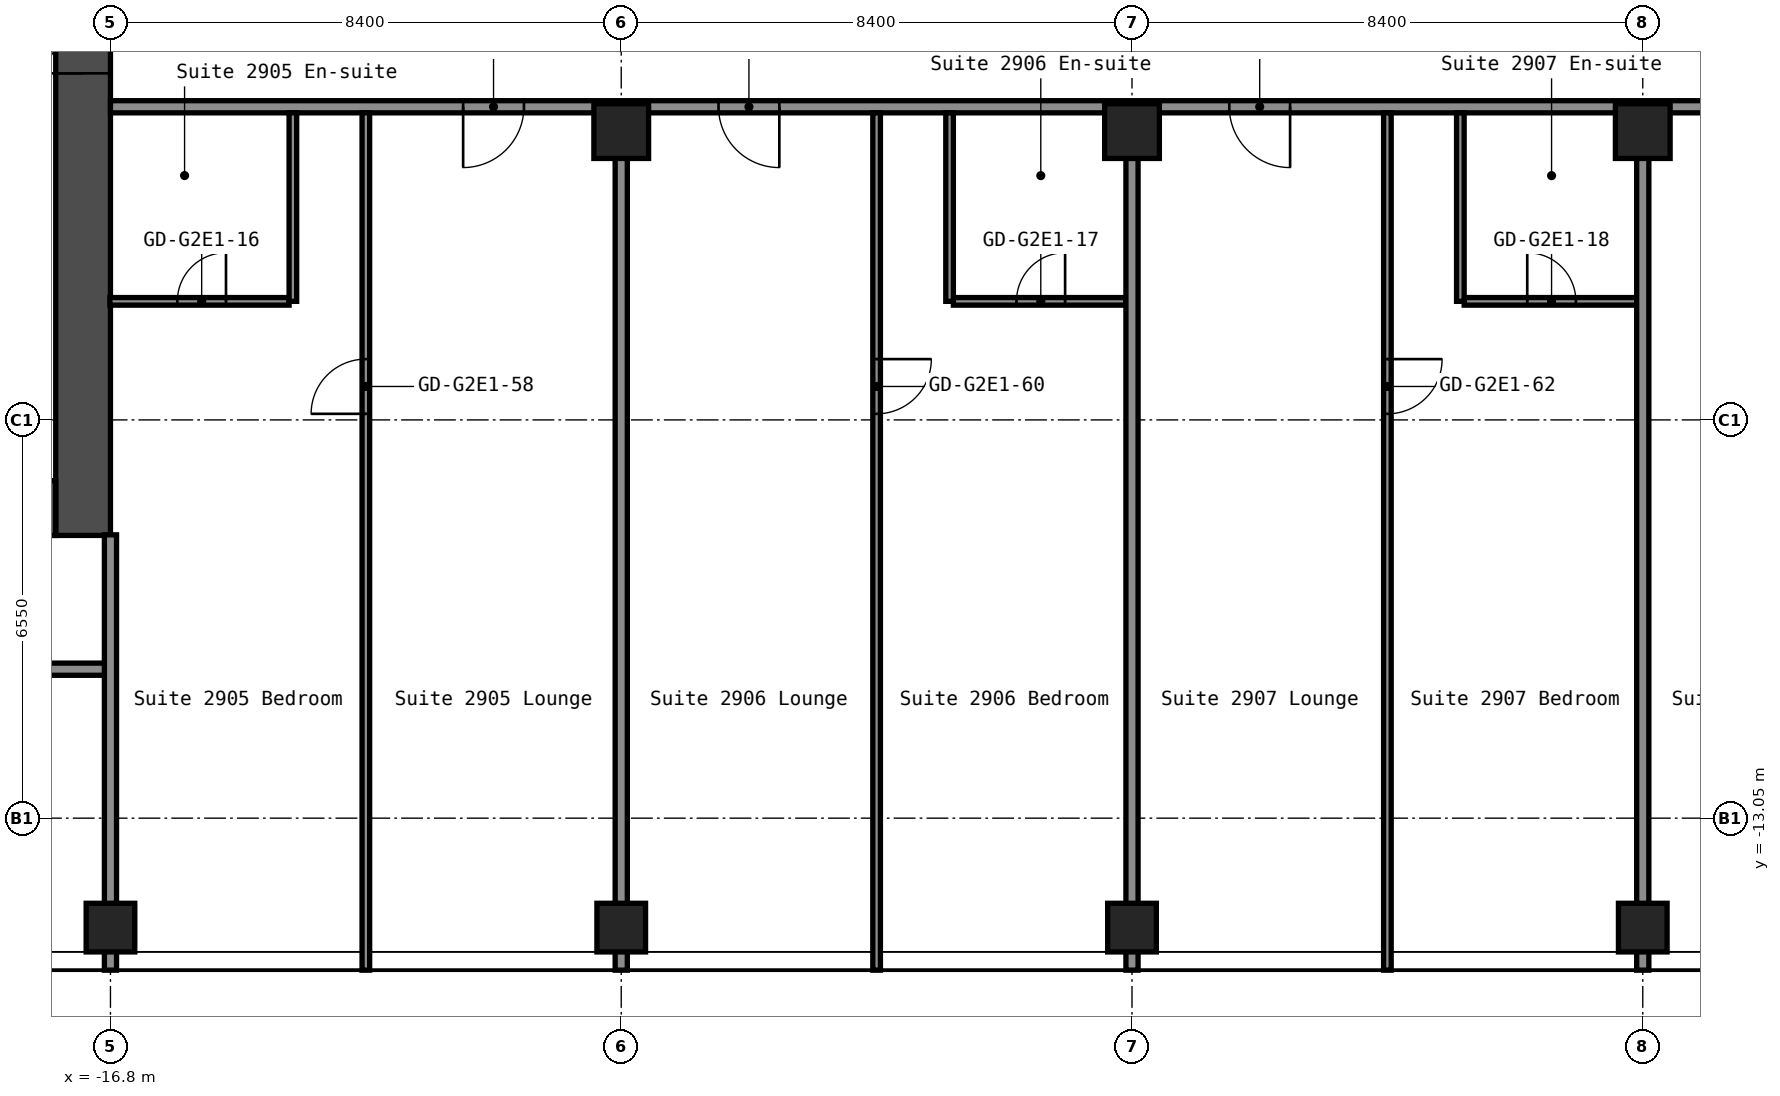
"""IFC4 building model, lengths in metres.
Left out: names, types, materials, properties, quantities, classifications, styles, units other than length and angle.
Written with IfcOpenShell. Run it as: python <this file> out.ifc"""

import sys

from ifc_helpers import new_model, si_unit, direction, frame, frame_2d, origin, origin_2d, place, context, subcontext, project, spatial, rectangle, hollow_rectangle, extrude, element, fill, save


model = new_model("IFC4")
c1 = context("Model", 3, precision=1e-05, world=origin(), true_north=direction((0.0, 1.0)))
c2 = subcontext(c1, "Body", "Model", "MODEL_VIEW")
j1 = project(units=[si_unit("LENGTHUNIT", "METRE"), si_unit("PLANEANGLEUNIT", "RADIAN")], contexts=[c1])
p1 = place(None, origin())
s1 = spatial("IfcSite", under=j1, at=p1, CompositionType="ELEMENT")
p2 = place(p1, origin())
s2 = spatial("IfcBuilding", under=s1, at=p2, CompositionType="ELEMENT")
p3 = place(p2, frame((0.0, 0.0, 104.2)))
s3 = spatial("IfcBuildingStorey", under=s2, at=p3, CompositionType="ELEMENT", Elevation=104.2)
for number, where, z_axis, x_axis in (
    (1, (-16.8, -14.85, 0.0), (0.0, 0.0, 1.0), (1.0, 0.0, 0.0)),
    (2, (-8.4, -14.85, 0.0), (0.0, 0.0, 1.0), (1.0, 0.0, 0.0)),
):
    element("IfcColumn", number, at=place(p3, frame(where, z_axis=z_axis, x_axis=x_axis)), inside=s3, PredefinedType="COLUMN", context=c2, shape_type="SweptSolid", body=[
        extrude(hollow_rectangle(XDim=0.8, YDim=0.8, WallThickness=0.032, at=origin_2d()), origin(), (0.0, 0.0, 1.0), 2.8),
    ])
p4 = place(p3, frame((-8.4, -1.75, 0.0), z_axis=(0.0, 0.0, 1.0), x_axis=(1.0, 0.0, 0.0)))
e3 = element("IfcColumn", 3, at=p4, inside=s3, PredefinedType="COLUMN", context=c2, shape_type="SweptSolid", body=[
    extrude(hollow_rectangle(XDim=0.9, YDim=0.9, WallThickness=0.036, at=origin_2d()), origin(), (0.0, 0.0, 1.0), 2.8),
])
p5 = place(p3, frame((0.0, -14.85, 0.0), z_axis=(0.0, 0.0, 1.0), x_axis=(1.0, 0.0, 0.0)))
e4 = element("IfcColumn", 4, at=p5, inside=s3, PredefinedType="COLUMN", context=c2, shape_type="SweptSolid", body=[
    extrude(hollow_rectangle(XDim=0.8, YDim=0.8, WallThickness=0.032, at=origin_2d()), origin(), (0.0, 0.0, 1.0), 2.8),
])
p6 = place(p3, frame((0.0, -1.75, 0.0), z_axis=(0.0, 0.0, 1.0), x_axis=(1.0, 0.0, 0.0)))
e5 = element("IfcColumn", 5, at=p6, inside=s3, PredefinedType="COLUMN", context=c2, shape_type="SweptSolid", body=[
    extrude(hollow_rectangle(XDim=0.9, YDim=0.9, WallThickness=0.036, at=origin_2d()), origin(), (0.0, 0.0, 1.0), 2.8),
])
p7 = place(p3, frame((8.4, -14.85, 0.0), z_axis=(0.0, 0.0, 1.0), x_axis=(1.0, 0.0, 0.0)))
e6 = element("IfcColumn", 6, at=p7, inside=s3, PredefinedType="COLUMN", context=c2, shape_type="SweptSolid", body=[
    extrude(hollow_rectangle(XDim=0.8, YDim=0.8, WallThickness=0.032, at=origin_2d()), origin(), (0.0, 0.0, 1.0), 2.8),
])
p8 = place(p3, frame((8.4, -1.75, 0.0), z_axis=(0.0, 0.0, 1.0), x_axis=(1.0, 0.0, 0.0)))
e7 = element("IfcColumn", 7, at=p8, inside=s3, PredefinedType="COLUMN", context=c2, shape_type="SweptSolid", body=[
    extrude(hollow_rectangle(XDim=0.9, YDim=0.9, WallThickness=0.036, at=origin_2d()), origin(), (0.0, 0.0, 1.0), 2.8),
])
p9 = place(p3, frame((-17.25, -8.4, 0.0), z_axis=(0.0, 0.0, 1.0), x_axis=(0.0, 1.0, 0.0)))
e8 = element("IfcWall", 8, at=p9, inside=s3, PredefinedType="SHEAR", context=c2, shape_type="SweptSolid", body=[
    extrude(rectangle(XDim=16.8, YDim=0.9, at=frame_2d((8.4, 0.0))), origin(), (0.0, 0.0, 1.0), 2.8),
])
p10 = place(p9, frame((7.6, 0.0, 0.0)))
e9 = element("IfcOpeningElement", 9, at=p10, cuts=e8, PredefinedType="OPENING", context=c2, shape_type="SweptSolid", body=[
    extrude(rectangle(XDim=1.2, YDim=2.1, at=frame_2d((0.6, 1.05))), frame((0.0, 0.46, 0.0), z_axis=(0.0, -1.0, 0.0), x_axis=(1.0, 0.0, 0.0)), (0.0, 0.0, 1.0), 0.92),
])
p11 = place(p3, frame((-32.7, -7.95, 0.0), z_axis=(0.0, 0.0, 1.0), x_axis=(1.0, 0.0, 0.0)))
e10 = element("IfcWall", 10, at=p11, inside=s3, PredefinedType="SHEAR", context=c2, shape_type="SweptSolid", body=[
    extrude(rectangle(XDim=15.0, YDim=0.9, at=frame_2d((7.5, 0.0))), origin(), (0.0, 0.0, 1.0), 2.8),
])
p12 = place(p11, frame((11.45, 0.0, 0.0)))
e11 = element("IfcOpeningElement", 11, at=p12, cuts=e10, PredefinedType="OPENING", context=c2, shape_type="SweptSolid", body=[
    extrude(rectangle(XDim=1.0, YDim=2.1, at=frame_2d((0.5, 1.05))), frame((0.0, 0.46, 0.0), z_axis=(0.0, -1.0, 0.0), x_axis=(1.0, 0.0, 0.0)), (0.0, 0.0, 1.0), 0.92),
])
p13 = place(p3, frame((-46.5, -10.6, 0.0), z_axis=(0.0, 0.0, 1.0), x_axis=(1.0, 0.0, 0.0)))
e12 = element("IfcWall", 12, at=p13, inside=s3, PredefinedType="PARTITIONING", context=c2, shape_type="SweptSolid", body=[
    extrude(rectangle(XDim=29.7, YDim=0.2, at=frame_2d((14.85, 0.0))), origin(), (0.0, 0.0, 1.0), 2.8),
])
p14 = place(p13, frame((1.95, 0.0, 0.0)))
e13 = element("IfcOpeningElement", 13, at=p14, cuts=e12, PredefinedType="OPENING", context=c2, shape_type="SweptSolid", body=[
    extrude(rectangle(XDim=0.9, YDim=2.1, at=frame_2d((0.45, 1.05))), frame((0.0, 0.11, 0.0), z_axis=(0.0, -1.0, 0.0), x_axis=(1.0, 0.0, 0.0)), (0.0, 0.0, 1.0), 0.22),
])
p15 = place(p13, frame((6.74, 0.0, 0.0)))
e14 = element("IfcOpeningElement", 14, at=p15, cuts=e12, PredefinedType="OPENING", context=c2, shape_type="SweptSolid", body=[
    extrude(rectangle(XDim=0.9, YDim=2.1, at=frame_2d((0.45, 1.05))), frame((0.0, 0.11, 0.0), z_axis=(0.0, -1.0, 0.0), x_axis=(1.0, 0.0, 0.0)), (0.0, 0.0, 1.0), 0.22),
])
p16 = place(p13, frame((10.94, 0.0, 0.0)))
e15 = element("IfcOpeningElement", 15, at=p16, cuts=e12, PredefinedType="OPENING", context=c2, shape_type="SweptSolid", body=[
    extrude(rectangle(XDim=0.9, YDim=2.1, at=frame_2d((0.45, 1.05))), frame((0.0, 0.11, 0.0), z_axis=(0.0, -1.0, 0.0), x_axis=(1.0, 0.0, 0.0)), (0.0, 0.0, 1.0), 0.22),
])
p17 = place(p13, frame((14.045, 0.0, 0.0)))
e16 = element("IfcOpeningElement", 16, at=p17, cuts=e12, PredefinedType="OPENING", context=c2, shape_type="SweptSolid", body=[
    extrude(rectangle(XDim=0.9, YDim=2.1, at=frame_2d((0.45, 1.05))), frame((0.0, 0.11, 0.0), z_axis=(0.0, -1.0, 0.0), x_axis=(1.0, 0.0, 0.0)), (0.0, 0.0, 1.0), 0.22),
])
p18 = place(p13, frame((18.245, 0.0, 0.0)))
e17 = element("IfcOpeningElement", 17, at=p18, cuts=e12, PredefinedType="OPENING", context=c2, shape_type="SweptSolid", body=[
    extrude(rectangle(XDim=0.9, YDim=2.1, at=frame_2d((0.45, 1.05))), frame((0.0, 0.11, 0.0), z_axis=(0.0, -1.0, 0.0), x_axis=(1.0, 0.0, 0.0)), (0.0, 0.0, 1.0), 0.22),
])
p19 = place(p13, frame((25.0, 0.0, 0.0)))
e18 = element("IfcOpeningElement", 18, at=p19, cuts=e12, PredefinedType="OPENING", context=c2, shape_type="SweptSolid", body=[
    extrude(rectangle(XDim=1.0, YDim=2.1, at=frame_2d((0.5, 1.05))), frame((0.0, 0.11, 0.0), z_axis=(0.0, -1.0, 0.0), x_axis=(1.0, 0.0, 0.0)), (0.0, 0.0, 1.0), 0.22),
])
p20 = place(p3, frame((-16.81, -4.55, 0.0), z_axis=(0.0, 0.0, 1.0), x_axis=(1.0, 0.0, 0.0)))
e19 = element("IfcWall", 19, at=p20, inside=s3, PredefinedType="PARTITIONING", context=c2, shape_type="SweptSolid", body=[
    extrude(rectangle(XDim=2.948, YDim=0.125, at=frame_2d((1.474, 0.0))), origin(), (0.0, 0.0, 1.0), 2.8),
])
p21 = place(p20, frame((1.11, 0.0, 0.0)))
e20 = element("IfcOpeningElement", 20, at=p21, cuts=e19, PredefinedType="OPENING", context=c2, shape_type="SweptSolid", body=[
    extrude(rectangle(XDim=0.8, YDim=2.1, at=frame_2d((0.4, 1.05))), frame((0.0, 0.073, 0.0), z_axis=(0.0, -1.0, 0.0), x_axis=(1.0, 0.0, 0.0)), (0.0, 0.0, 1.0), 0.145),
])
p22 = place(p3, frame((-2.938, -4.55, 0.0), z_axis=(0.0, 0.0, 1.0), x_axis=(1.0, 0.0, 0.0)))
e21 = element("IfcWall", 21, at=p22, inside=s3, PredefinedType="PARTITIONING", context=c2, shape_type="SweptSolid", body=[
    extrude(rectangle(XDim=2.837, YDim=0.125, at=frame_2d((1.419, 0.0))), origin(), (0.0, 0.0, 1.0), 2.8),
])
p23 = place(p22, frame((1.038, 0.0, 0.0)))
e22 = element("IfcOpeningElement", 22, at=p23, cuts=e21, PredefinedType="OPENING", context=c2, shape_type="SweptSolid", body=[
    extrude(rectangle(XDim=0.8, YDim=2.1, at=frame_2d((0.4, 1.05))), frame((0.0, 0.073, 0.0), z_axis=(0.0, -1.0, 0.0), x_axis=(1.0, 0.0, 0.0)), (0.0, 0.0, 1.0), 0.145),
])
p24 = place(p3, frame((5.462, -4.55, 0.0), z_axis=(0.0, 0.0, 1.0), x_axis=(1.0, 0.0, 0.0)))
e23 = element("IfcWall", 23, at=p24, inside=s3, PredefinedType="PARTITIONING", context=c2, shape_type="SweptSolid", body=[
    extrude(rectangle(XDim=2.838, YDim=0.125, at=frame_2d((1.419, 0.0))), origin(), (0.0, 0.0, 1.0), 2.8),
])
p25 = place(p24, frame((1.038, 0.0, 0.0)))
e24 = element("IfcOpeningElement", 24, at=p25, cuts=e23, PredefinedType="OPENING", context=c2, shape_type="SweptSolid", body=[
    extrude(rectangle(XDim=0.8, YDim=2.1, at=frame_2d((0.4, 1.05))), frame((0.0, 0.073, 0.0), z_axis=(0.0, -1.0, 0.0), x_axis=(1.0, 0.0, 0.0)), (0.0, 0.0, 1.0), 0.145),
])
p26 = place(p3, frame((-16.8, -1.35, 0.0), z_axis=(0.0, 0.0, 1.0), x_axis=(1.0, 0.0, 0.0)))
e25 = element("IfcWall", 25, at=p26, inside=s3, PredefinedType="PARTITIONING", context=c2, shape_type="SweptSolid", body=[
    extrude(rectangle(XDim=33.6, YDim=0.2, at=frame_2d((16.8, 0.0))), origin(), (0.0, 0.0, 1.0), 2.8),
])
p27 = place(p26, frame((5.8, 0.0, 0.0)))
e26 = element("IfcOpeningElement", 26, at=p27, cuts=e25, PredefinedType="OPENING", context=c2, shape_type="SweptSolid", body=[
    extrude(rectangle(XDim=1.0, YDim=2.1, at=frame_2d((0.5, 1.05))), frame((0.0, 0.11, 0.0), z_axis=(0.0, -1.0, 0.0), x_axis=(1.0, 0.0, 0.0)), (0.0, 0.0, 1.0), 0.22),
])
p28 = place(p26, frame((10.0, 0.0, 0.0)))
e27 = element("IfcOpeningElement", 27, at=p28, cuts=e25, PredefinedType="OPENING", context=c2, shape_type="SweptSolid", body=[
    extrude(rectangle(XDim=1.0, YDim=2.1, at=frame_2d((0.5, 1.05))), frame((0.0, 0.11, 0.0), z_axis=(0.0, -1.0, 0.0), x_axis=(1.0, 0.0, 0.0)), (0.0, 0.0, 1.0), 0.22),
])
p29 = place(p26, frame((18.4, 0.0, 0.0)))
e28 = element("IfcOpeningElement", 28, at=p29, cuts=e25, PredefinedType="OPENING", context=c2, shape_type="SweptSolid", body=[
    extrude(rectangle(XDim=1.0, YDim=2.1, at=frame_2d((0.5, 1.05))), frame((0.0, 0.11, 0.0), z_axis=(0.0, -1.0, 0.0), x_axis=(1.0, 0.0, 0.0)), (0.0, 0.0, 1.0), 0.22),
])
p30 = place(p26, frame((26.8, 0.0, 0.0)))
e29 = element("IfcOpeningElement", 29, at=p30, cuts=e25, PredefinedType="OPENING", context=c2, shape_type="SweptSolid", body=[
    extrude(rectangle(XDim=1.0, YDim=2.1, at=frame_2d((0.5, 1.05))), frame((0.0, 0.11, 0.0), z_axis=(0.0, -1.0, 0.0), x_axis=(1.0, 0.0, 0.0)), (0.0, 0.0, 1.0), 0.22),
])
p31 = place(p3, frame((-16.8, -15.55, 0.0), z_axis=(0.0, 0.0, 1.0), x_axis=(0.0, 1.0, 0.0)))
e30 = element("IfcWall", 30, at=p31, inside=s3, PredefinedType="PARTITIONING", context=c2, shape_type="SweptSolid", body=[
    extrude(rectangle(XDim=7.16, YDim=0.2, at=frame_2d((3.58, 0.0))), origin(), (0.0, 0.0, 1.0), 2.8),
])
p32 = place(p3, frame((-13.8, -4.55, 0.0), z_axis=(0.0, 0.0, 1.0), x_axis=(0.0, 1.0, 0.0)))
e31 = element("IfcWall", 31, at=p32, inside=s3, PredefinedType="PARTITIONING", context=c2, shape_type="SweptSolid", body=[
    extrude(rectangle(XDim=3.1, YDim=0.125, at=frame_2d((1.55, 0.0))), origin(), (0.0, 0.0, 1.0), 2.8),
])
p33 = place(p3, frame((-12.6, -15.55, 0.0), z_axis=(0.0, 0.0, 1.0), x_axis=(0.0, 1.0, 0.0)))
e32 = element("IfcWall", 32, at=p33, inside=s3, PredefinedType="PARTITIONING", context=c2, shape_type="SweptSolid", body=[
    extrude(rectangle(XDim=14.1, YDim=0.125, at=frame_2d((7.05, 0.0))), origin(), (0.0, 0.0, 1.0), 2.8),
])
p34 = place(p33, frame((9.15, 0.0, 0.0)))
e33 = element("IfcOpeningElement", 33, at=p34, cuts=e32, PredefinedType="OPENING", context=c2, shape_type="SweptSolid", body=[
    extrude(rectangle(XDim=0.9, YDim=2.1, at=frame_2d((0.45, 1.05))), frame((0.0, 0.073, 0.0), z_axis=(0.0, -1.0, 0.0), x_axis=(1.0, 0.0, 0.0)), (0.0, 0.0, 1.0), 0.145),
])
p35 = place(p3, frame((-8.4, -15.55, 0.0), z_axis=(0.0, 0.0, 1.0), x_axis=(0.0, 1.0, 0.0)))
e34 = element("IfcWall", 34, at=p35, inside=s3, PredefinedType="PARTITIONING", context=c2, shape_type="SweptSolid", body=[
    extrude(rectangle(XDim=13.36, YDim=0.2, at=frame_2d((6.68, 0.0))), origin(), (0.0, 0.0, 1.0), 2.8),
])
p36 = place(p3, frame((-4.2, -15.55, 0.0), z_axis=(0.0, 0.0, 1.0), x_axis=(0.0, 1.0, 0.0)))
e35 = element("IfcWall", 35, at=p36, inside=s3, PredefinedType="PARTITIONING", context=c2, shape_type="SweptSolid", body=[
    extrude(rectangle(XDim=14.1, YDim=0.125, at=frame_2d((7.05, 0.0))), origin(), (0.0, 0.0, 1.0), 2.8),
])
p37 = place(p36, frame((9.15, 0.0, 0.0)))
e36 = element("IfcOpeningElement", 36, at=p37, cuts=e35, PredefinedType="OPENING", context=c2, shape_type="SweptSolid", body=[
    extrude(rectangle(XDim=0.9, YDim=2.1, at=frame_2d((0.45, 1.05))), frame((0.0, 0.073, 0.0), z_axis=(0.0, -1.0, 0.0), x_axis=(1.0, 0.0, 0.0)), (0.0, 0.0, 1.0), 0.145),
])
p38 = place(p3, frame((-3.0, -4.55, 0.0), z_axis=(0.0, 0.0, 1.0), x_axis=(0.0, 1.0, 0.0)))
e37 = element("IfcWall", 37, at=p38, inside=s3, PredefinedType="PARTITIONING", context=c2, shape_type="SweptSolid", body=[
    extrude(rectangle(XDim=3.1, YDim=0.125, at=frame_2d((1.55, 0.0))), origin(), (0.0, 0.0, 1.0), 2.8),
])
p39 = place(p3, frame((0.0, -15.55, 0.0), z_axis=(0.0, 0.0, 1.0), x_axis=(0.0, 1.0, 0.0)))
e38 = element("IfcWall", 38, at=p39, inside=s3, PredefinedType="PARTITIONING", context=c2, shape_type="SweptSolid", body=[
    extrude(rectangle(XDim=13.36, YDim=0.2, at=frame_2d((6.68, 0.0))), origin(), (0.0, 0.0, 1.0), 2.8),
])
p40 = place(p3, frame((4.2, -15.55, 0.0), z_axis=(0.0, 0.0, 1.0), x_axis=(0.0, 1.0, 0.0)))
e39 = element("IfcWall", 39, at=p40, inside=s3, PredefinedType="PARTITIONING", context=c2, shape_type="SweptSolid", body=[
    extrude(rectangle(XDim=14.1, YDim=0.125, at=frame_2d((7.05, 0.0))), origin(), (0.0, 0.0, 1.0), 2.8),
])
p41 = place(p40, frame((9.15, 0.0, 0.0)))
e40 = element("IfcOpeningElement", 40, at=p41, cuts=e39, PredefinedType="OPENING", context=c2, shape_type="SweptSolid", body=[
    extrude(rectangle(XDim=0.9, YDim=2.1, at=frame_2d((0.45, 1.05))), frame((0.0, 0.073, 0.0), z_axis=(0.0, -1.0, 0.0), x_axis=(1.0, 0.0, 0.0)), (0.0, 0.0, 1.0), 0.145),
])
p42 = place(p3, frame((5.4, -4.55, 0.0), z_axis=(0.0, 0.0, 1.0), x_axis=(0.0, 1.0, 0.0)))
e41 = element("IfcWall", 41, at=p42, inside=s3, PredefinedType="PARTITIONING", context=c2, shape_type="SweptSolid", body=[
    extrude(rectangle(XDim=3.1, YDim=0.125, at=frame_2d((1.55, 0.0))), origin(), (0.0, 0.0, 1.0), 2.8),
])
p43 = place(p3, frame((8.4, -15.55, 0.0), z_axis=(0.0, 0.0, 1.0), x_axis=(0.0, 1.0, 0.0)))
e42 = element("IfcWall", 42, at=p43, inside=s3, PredefinedType="PARTITIONING", context=c2, shape_type="SweptSolid", body=[
    extrude(rectangle(XDim=13.36, YDim=0.2, at=frame_2d((6.68, 0.0))), origin(), (0.0, 0.0, 1.0), 2.8),
])
p44 = place(p10, origin())
e43 = element("IfcDoor", 43, at=p44, inside=s3, OperationType="DOUBLE_DOOR_SINGLE_SWING", PredefinedType="DOOR", context=c2, shape_type="SweptSolid", body=[
    extrude(rectangle(XDim=1.2, YDim=2.1, at=frame_2d((0.6, 1.05))), frame((0.0, 0.025, 0.0), z_axis=(0.0, -1.0, 0.0), x_axis=(1.0, 0.0, 0.0)), (0.0, 0.0, 1.0), 0.05),
])
fill(e9, e43)
p45 = place(p21, origin())
e44 = element("IfcDoor", 44, at=p45, inside=s3, OperationType="SINGLE_SWING_LEFT", PredefinedType="DOOR", context=c2, shape_type="SweptSolid", body=[
    extrude(rectangle(XDim=0.8, YDim=2.1, at=frame_2d((0.4, 1.05))), frame((0.0, 0.025, 0.0), z_axis=(0.0, -1.0, 0.0), x_axis=(1.0, 0.0, 0.0)), (0.0, 0.0, 1.0), 0.05),
])
fill(e20, e44)
p46 = place(p23, origin())
e45 = element("IfcDoor", 45, at=p46, inside=s3, OperationType="SINGLE_SWING_LEFT", PredefinedType="DOOR", context=c2, shape_type="SweptSolid", body=[
    extrude(rectangle(XDim=0.8, YDim=2.1, at=frame_2d((0.4, 1.05))), frame((0.0, 0.025, 0.0), z_axis=(0.0, -1.0, 0.0), x_axis=(1.0, 0.0, 0.0)), (0.0, 0.0, 1.0), 0.05),
])
fill(e22, e45)
p47 = place(p25, origin())
e46 = element("IfcDoor", 46, at=p47, inside=s3, OperationType="SINGLE_SWING_RIGHT", PredefinedType="DOOR", context=c2, shape_type="SweptSolid", body=[
    extrude(rectangle(XDim=0.8, YDim=2.1, at=frame_2d((0.4, 1.05))), frame((0.0, 0.025, 0.0), z_axis=(0.0, -1.0, 0.0), x_axis=(1.0, 0.0, 0.0)), (0.0, 0.0, 1.0), 0.05),
])
fill(e24, e46)
p48 = place(p27, origin())
e47 = element("IfcDoor", 47, at=p48, inside=s3, OperationType="SINGLE_SWING_LEFT", PredefinedType="DOOR", context=c2, shape_type="SweptSolid", body=[
    extrude(rectangle(XDim=1.0, YDim=2.1, at=frame_2d((0.5, 1.05))), frame((0.0, 0.025, 0.0), z_axis=(0.0, -1.0, 0.0), x_axis=(1.0, 0.0, 0.0)), (0.0, 0.0, 1.0), 0.05),
])
fill(e26, e47)
p49 = place(p28, origin())
e48 = element("IfcDoor", 48, at=p49, inside=s3, OperationType="SINGLE_SWING_RIGHT", PredefinedType="DOOR", context=c2, shape_type="SweptSolid", body=[
    extrude(rectangle(XDim=1.0, YDim=2.1, at=frame_2d((0.5, 1.05))), frame((0.0, 0.025, 0.0), z_axis=(0.0, -1.0, 0.0), x_axis=(1.0, 0.0, 0.0)), (0.0, 0.0, 1.0), 0.05),
])
fill(e27, e48)
p50 = place(p29, origin())
e49 = element("IfcDoor", 49, at=p50, inside=s3, OperationType="SINGLE_SWING_RIGHT", PredefinedType="DOOR", context=c2, shape_type="SweptSolid", body=[
    extrude(rectangle(XDim=1.0, YDim=2.1, at=frame_2d((0.5, 1.05))), frame((0.0, 0.025, 0.0), z_axis=(0.0, -1.0, 0.0), x_axis=(1.0, 0.0, 0.0)), (0.0, 0.0, 1.0), 0.05),
])
fill(e28, e49)
p51 = place(p34, origin())
e50 = element("IfcDoor", 50, at=p51, inside=s3, OperationType="SINGLE_SWING_RIGHT", PredefinedType="DOOR", context=c2, shape_type="SweptSolid", body=[
    extrude(rectangle(XDim=0.9, YDim=2.1, at=frame_2d((0.45, 1.05))), frame((0.0, 0.025, 0.0), z_axis=(0.0, -1.0, 0.0), x_axis=(1.0, 0.0, 0.0)), (0.0, 0.0, 1.0), 0.05),
])
fill(e33, e50)
p52 = place(p37, origin())
e51 = element("IfcDoor", 51, at=p52, inside=s3, OperationType="SINGLE_SWING_RIGHT", PredefinedType="DOOR", context=c2, shape_type="SweptSolid", body=[
    extrude(rectangle(XDim=0.9, YDim=2.1, at=frame_2d((0.45, 1.05))), frame((0.0, 0.025, 0.0), z_axis=(0.0, -1.0, 0.0), x_axis=(1.0, 0.0, 0.0)), (0.0, 0.0, 1.0), 0.05),
])
fill(e36, e51)
p53 = place(p41, origin())
e52 = element("IfcDoor", 52, at=p53, inside=s3, OperationType="SINGLE_SWING_RIGHT", PredefinedType="DOOR", context=c2, shape_type="SweptSolid", body=[
    extrude(rectangle(XDim=0.9, YDim=2.1, at=frame_2d((0.45, 1.05))), frame((0.0, 0.025, 0.0), z_axis=(0.0, -1.0, 0.0), x_axis=(1.0, 0.0, 0.0)), (0.0, 0.0, 1.0), 0.05),
])
fill(e40, e52)
save(model, sys.argv[1])
